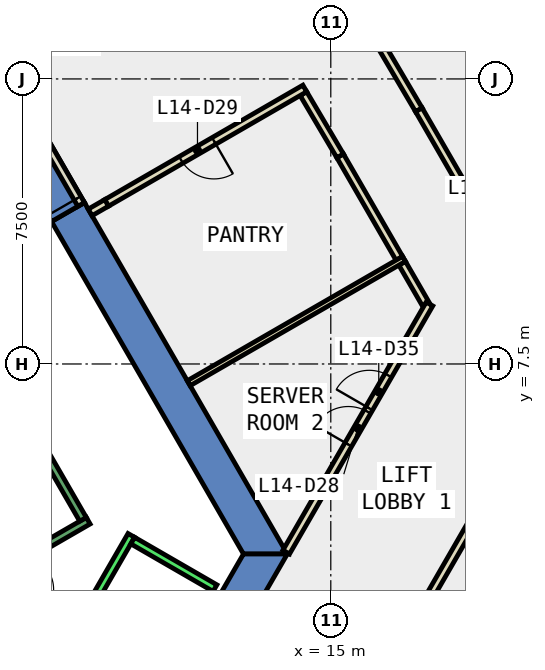
"""IFC4 building model, lengths in metres.
Left out: names, types, materials, properties, quantities, classifications, styles, units other than length and angle.
Written with IfcOpenShell. Run it as: python <this file> out.ifc"""

import sys

from ifc_helpers import new_model, si_unit, direction, frame, frame_2d, origin, place, context, subcontext, project, spatial, polyline, rectangle, outline, extrude, element, fill, save


model = new_model("IFC4")
c1 = context("Model", 3, precision=1e-05, world=origin(), true_north=direction((0.0, 1.0)))
c2 = subcontext(c1, "Body", "Model", "MODEL_VIEW")
j1 = project(units=[si_unit("LENGTHUNIT", "METRE"), si_unit("PLANEANGLEUNIT", "RADIAN")], contexts=[c1])
p1 = place(None, origin())
s1 = spatial("IfcSite", under=j1, at=p1, CompositionType="ELEMENT")
p2 = place(p1, origin())
s2 = spatial("IfcBuilding", under=s1, at=p2, CompositionType="ELEMENT")
p3 = place(p2, frame((0.0, 0.0, 68.6)))
s3 = spatial("IfcBuildingStorey", under=s2, at=p3, CompositionType="ELEMENT", Elevation=68.6)
p4 = place(p3, frame((0.0, 0.0, -0.4)))
e1 = element("IfcWall", 1, at=p4, inside=s3, PredefinedType="SHEAR", context=c2, shape_type="SweptSolid", body=[
    extrude(outline(polyline([(8.517, 11.748), (7.651, 11.248), (12.702, 2.5), (13.856, 2.5), (8.517, 11.748)])), origin(), (0.0, 0.0, 1.0), 4.2),
])
p5 = place(p3, frame((0.0, 0.0, 3.6)))
e2 = element("IfcWall", 2, at=p5, inside=s3, PredefinedType="SHEAR", context=c2, shape_type="SweptSolid", body=[
    extrude(outline(polyline([(7.517, 13.48), (6.651, 12.98), (7.651, 11.248), (8.517, 11.748), (7.517, 13.48)])), origin(), (0.0, 0.0, 1.0), 0.2),
])
p6 = place(p3, frame((0.0, 0.0, -0.4)))
e3 = element("IfcWall", 3, at=p6, inside=s3, PredefinedType="SHEAR", context=c2, shape_type="SweptSolid", body=[
    extrude(outline(polyline([(11.801, 0.94), (12.667, 0.44), (13.856, 2.5), (12.702, 2.5), (11.801, 0.94)])), origin(), (0.0, 0.0, 1.0), 4.2),
])
p7 = place(p3, frame((17.497, 9.078, 0.0), z_axis=(0.0, 0.0, 1.0), x_axis=(-0.500126451326, 0.865952384768, 0.0)))
e4 = element("IfcWall", 4, at=p7, inside=s3, PredefinedType="PARTITIONING", context=c2, shape_type="SweptSolid", body=[
    extrude(rectangle(XDim=1.238, YDim=0.2, at=frame_2d((0.619, 0.0))), origin(), (0.0, 0.0, 1.0), 3.8),
])
p8 = place(p3, frame((16.803, 10.28, 0.0), z_axis=(0.0, 0.0, 1.0), x_axis=(-0.499941881293, 0.866058956036, 0.0)))
e5 = element("IfcWall", 5, at=p8, inside=s3, PredefinedType="PARTITIONING", context=c2, shape_type="SweptSolid", body=[
    extrude(rectangle(XDim=3.114, YDim=0.2, at=frame_2d((1.557, 0.0))), origin(), (0.0, 0.0, 1.0), 3.8),
])
p9 = place(p3, frame((15.246, 12.977, 0.0), z_axis=(0.0, 0.0, 1.0), x_axis=(-0.508473864329, 0.861077423519, 0.0)))
e6 = element("IfcWall", 6, at=p9, inside=s3, PredefinedType="PARTITIONING", context=c2, shape_type="SweptSolid", body=[
    extrude(rectangle(XDim=1.9, YDim=0.2, at=frame_2d((0.95, 0.0))), origin(), (0.0, 0.0, 1.0), 3.8),
])
p10 = place(p3, frame((14.316, 14.75, 0.0), z_axis=(0.0, 0.0, 1.0), x_axis=(-0.865981716183, -0.500075661512, 0.0)))
e7 = element("IfcWall", 7, at=p10, inside=s3, PredefinedType="PARTITIONING", context=c2, shape_type="SweptSolid", body=[
    extrude(rectangle(XDim=6.023, YDim=0.2, at=frame_2d((3.011, 0.0))), origin(), (0.0, 0.0, 1.0), 3.8),
])
p11 = place(p10, frame((2.761, 0.0, 0.0)))
e8 = element("IfcOpeningElement", 8, at=p11, cuts=e7, PredefinedType="OPENING", context=c2, shape_type="SweptSolid", body=[
    extrude(rectangle(XDim=1.0, YDim=2.1, at=frame_2d((0.5, 1.05))), frame((0.0, 0.11, 0.0), z_axis=(0.0, -1.0, 0.0), x_axis=(1.0, 0.0, 0.0)), (0.0, 0.0, 1.0), 0.22),
])
p12 = place(p3, frame((15.512, 17.248, 0.0), z_axis=(0.0, 0.0, 1.0), x_axis=(0.508178415101, -0.861251820564, 0.0)))
e9 = element("IfcWall", 9, at=p12, inside=s3, PredefinedType="PARTITIONING", context=c2, shape_type="SweptSolid", body=[
    extrude(rectangle(XDim=3.554, YDim=0.2, at=frame_2d((1.777, 0.0))), origin(), (0.0, 0.0, 1.0), 3.8),
])
p13 = place(p3, frame((17.318, 14.187, 0.0), z_axis=(0.0, 0.0, 1.0), x_axis=(0.499986381413, -0.866033266336, 0.0)))
e10 = element("IfcWall", 10, at=p13, inside=s3, PredefinedType="PARTITIONING", context=c2, shape_type="SweptSolid", body=[
    extrude(rectangle(XDim=7.18, YDim=0.2, at=frame_2d((3.59, 0.0))), origin(), (0.0, 0.0, 1.0), 3.8),
])
p14 = place(p13, frame((3.165, 0.0, 0.0)))
e11 = element("IfcOpeningElement", 11, at=p14, cuts=e10, PredefinedType="OPENING", context=c2, shape_type="SweptSolid", body=[
    extrude(rectangle(XDim=1.0, YDim=2.1, at=frame_2d((0.5, 1.05))), frame((0.0, 0.11, 0.0), z_axis=(0.0, -1.0, 0.0), x_axis=(1.0, 0.0, 0.0)), (0.0, 0.0, 1.0), 0.22),
])
p15 = place(p3, frame((6.25, 1.894, 0.0), z_axis=(0.0, 0.0, 1.0), x_axis=(0.866043184279, -0.499969202016, 0.0)))
e12 = element("IfcWall", 12, at=p15, inside=s3, PredefinedType="PARTITIONING", context=c2, shape_type="SweptSolid", body=[
    extrude(rectangle(XDim=2.084, YDim=0.2, at=frame_2d((1.042, 0.0))), origin(), (0.0, 0.0, 1.0), 3.8),
])
p16 = place(p15, frame((0.642, 0.0, 0.0)))
e13 = element("IfcOpeningElement", 13, at=p16, cuts=e12, PredefinedType="OPENING", context=c2, shape_type="SweptSolid", body=[
    extrude(rectangle(XDim=0.9, YDim=2.1, at=frame_2d((0.45, 1.05))), frame((0.0, 0.11, 0.0), z_axis=(0.0, -1.0, 0.0), x_axis=(1.0, 0.0, 0.0)), (0.0, 0.0, 1.0), 0.22),
])
p17 = place(p3, frame((11.261, 6.994, 0.0), z_axis=(0.0, 0.0, 1.0), x_axis=(0.866043905515, 0.499967952693, 0.0)))
e14 = element("IfcWall", 14, at=p17, inside=s3, PredefinedType="PARTITIONING", context=c2, shape_type="SweptSolid", body=[
    extrude(rectangle(XDim=6.542, YDim=0.15, at=frame_2d((3.271, 0.0))), origin(), (0.0, 0.0, 1.0), 3.8),
])
p18 = place(p3, frame((13.827, 2.55, 0.0), z_axis=(0.0, 0.0, 1.0), x_axis=(0.500116794417, 0.865957961995, 0.0)))
e15 = element("IfcWall", 15, at=p18, inside=s3, PredefinedType="PARTITIONING", context=c2, shape_type="SweptSolid", body=[
    extrude(rectangle(XDim=7.538, YDim=0.2, at=frame_2d((3.769, 0.0))), origin(), (0.0, 0.0, 1.0), 3.8),
])
p19 = place(p18, frame((3.269, 0.0, 0.0)))
e16 = element("IfcOpeningElement", 16, at=p19, cuts=e15, PredefinedType="OPENING", context=c2, shape_type="SweptSolid", body=[
    extrude(rectangle(XDim=1.0, YDim=2.1, at=frame_2d((0.5, 1.05))), frame((0.0, 0.11, 0.0), z_axis=(0.0, -1.0, 0.0), x_axis=(1.0, 0.0, 0.0)), (0.0, 0.0, 1.0), 0.22),
])
p20 = place(p18, frame((4.369, 0.0, 0.0)))
e17 = element("IfcOpeningElement", 17, at=p20, cuts=e15, PredefinedType="OPENING", context=c2, shape_type="SweptSolid", body=[
    extrude(rectangle(XDim=1.0, YDim=2.1, at=frame_2d((0.5, 1.05))), frame((0.0, 0.11, 0.0), z_axis=(0.0, -1.0, 0.0), x_axis=(1.0, 0.0, 0.0)), (0.0, 0.0, 1.0), 0.22),
])
p21 = place(p3, frame((19.81, 5.211, 0.0), z_axis=(0.0, 0.0, 1.0), x_axis=(-0.500003368273, -0.866023459102, 0.0)))
e18 = element("IfcWall", 18, at=p21, inside=s3, PredefinedType="PARTITIONING", context=c2, shape_type="SweptSolid", body=[
    extrude(rectangle(XDim=14.018, YDim=0.2, at=frame_2d((7.009, 0.0))), origin(), (0.0, 0.0, 1.0), 3.8),
])
p22 = place(p3, frame((8.43, 11.698, 0.0), z_axis=(0.0, 0.0, 1.0), x_axis=(-0.50002537861, 0.866010750942, 0.0)))
e19 = element("IfcWall", 19, at=p22, inside=s3, PredefinedType="PARTITIONING", context=c2, shape_type="SweptSolid", body=[
    extrude(rectangle(XDim=2.0, YDim=0.2, at=frame_2d((1.0, 0.0))), origin(), (0.0, 0.0, 1.0), 2.4),
])
p23 = place(p22, frame((0.19, 0.0, 0.0)))
e20 = element("IfcOpeningElement", 20, at=p23, cuts=e19, PredefinedType="OPENING", context=c2, shape_type="SweptSolid", body=[
    extrude(rectangle(XDim=1.8, YDim=2.1, at=frame_2d((0.9, 1.05))), frame((0.0, 0.11, 0.0), z_axis=(0.0, -1.0, 0.0), x_axis=(1.0, 0.0, 0.0)), (0.0, 0.0, 1.0), 0.22),
])
p24 = place(p3, frame((9.1, 11.738, 0.0), z_axis=(0.0, 0.0, 1.0), x_axis=(-0.866071776036, -0.499919672301, 0.0)))
e21 = element("IfcWall", 21, at=p24, inside=s3, PredefinedType="PARTITIONING", context=c2, shape_type="SweptSolid", body=[
    extrude(rectangle(XDim=0.5, YDim=0.2, at=frame_2d((0.25, 0.0))), origin(), (0.0, 0.0, 1.0), 2.4),
])
p25 = place(p3, frame((4.451, -6.19, 0.0), z_axis=(0.0, 0.0, 1.0), x_axis=(0.50000090737, 0.866024879913, 0.0)))
e22 = element("IfcWall", 22, at=p25, inside=s3, PredefinedType="STANDARD", context=c2, shape_type="SweptSolid", body=[
    extrude(rectangle(XDim=10.6, YDim=0.2, at=frame_2d((5.3, 0.0))), origin(), (0.0, 0.0, 1.0), 3.8),
])
p26 = place(p3, frame((9.788, 2.853, 0.0), z_axis=(0.0, 0.0, 1.0), x_axis=(0.865998541277, -0.500046524342, 0.0)))
e23 = element("IfcWall", 23, at=p26, inside=s3, PredefinedType="STANDARD", context=c2, shape_type="SweptSolid", body=[
    extrude(rectangle(XDim=2.5, YDim=0.2, at=frame_2d((1.25, 0.0))), origin(), (0.0, 0.0, 1.0), 3.8),
])
p27 = place(p3, frame((4.806, 1.176, 0.0), z_axis=(0.0, 0.0, 1.0), x_axis=(0.866059941101, 0.499940174841, 0.0)))
e24 = element("IfcWall", 24, at=p27, inside=s3, PredefinedType="STANDARD", context=c2, shape_type="SweptSolid", body=[
    extrude(rectangle(XDim=4.4, YDim=0.2, at=frame_2d((2.2, 0.0))), origin(), (0.0, 0.0, 1.0), 3.8),
])
p28 = place(p27, frame((1.65, 0.0, 0.0)))
e25 = element("IfcOpeningElement", 25, at=p28, cuts=e24, PredefinedType="OPENING", context=c2, shape_type="SweptSolid", body=[
    extrude(rectangle(XDim=1.1, YDim=2.2, at=frame_2d((0.55, 1.1))), frame((0.0, 0.11, 0.0), z_axis=(0.0, -1.0, 0.0), x_axis=(1.0, 0.0, 0.0)), (0.0, 0.0, 1.0), 0.22),
])
p29 = place(p3, frame((8.48, 3.412, 0.0), z_axis=(0.0, 0.0, 1.0), x_axis=(-0.499978703459, 0.866037698999, 0.0)))
e26 = element("IfcWall", 26, at=p29, inside=s3, PredefinedType="STANDARD", context=c2, shape_type="SweptSolid", body=[
    extrude(rectangle(XDim=6.9, YDim=0.2, at=frame_2d((3.45, 0.0))), origin(), (0.0, 0.0, 1.0), 3.8),
])
p30 = place(p19, origin())
e27 = element("IfcDoor", 27, at=p30, inside=s3, OperationType="SINGLE_SWING_LEFT", PredefinedType="DOOR", context=c2, shape_type="SweptSolid", body=[
    extrude(rectangle(XDim=1.0, YDim=2.1, at=frame_2d((0.5, 1.05))), frame((0.0, 0.025, 0.0), z_axis=(0.0, -1.0, 0.0), x_axis=(1.0, 0.0, 0.0)), (0.0, 0.0, 1.0), 0.05),
])
fill(e16, e27)
p31 = place(p11, origin())
e28 = element("IfcDoor", 28, at=p31, inside=s3, OperationType="SINGLE_SWING_LEFT", PredefinedType="DOOR", context=c2, shape_type="SweptSolid", body=[
    extrude(rectangle(XDim=1.0, YDim=2.1, at=frame_2d((0.5, 1.05))), frame((0.0, 0.025, 0.0), z_axis=(0.0, -1.0, 0.0), x_axis=(1.0, 0.0, 0.0)), (0.0, 0.0, 1.0), 0.05),
])
fill(e8, e28)
p32 = place(p20, origin())
e29 = element("IfcDoor", 29, at=p32, inside=s3, OperationType="SINGLE_SWING_RIGHT", PredefinedType="DOOR", context=c2, shape_type="SweptSolid", body=[
    extrude(rectangle(XDim=1.0, YDim=2.1, at=frame_2d((0.5, 1.05))), frame((0.0, 0.025, 0.0), z_axis=(0.0, -1.0, 0.0), x_axis=(1.0, 0.0, 0.0)), (0.0, 0.0, 1.0), 0.05),
])
fill(e17, e29)
p33 = place(p23, origin())
e30 = element("IfcDoor", 30, at=p33, inside=s3, OperationType="DOUBLE_DOOR_SINGLE_SWING", PredefinedType="DOOR", context=c2, shape_type="SweptSolid", body=[
    extrude(rectangle(XDim=1.8, YDim=2.1, at=frame_2d((0.9, 1.05))), frame((0.0, 0.025, 0.0), z_axis=(0.0, -1.0, 0.0), x_axis=(1.0, 0.0, 0.0)), (0.0, 0.0, 1.0), 0.05),
])
fill(e20, e30)
save(model, sys.argv[1])
